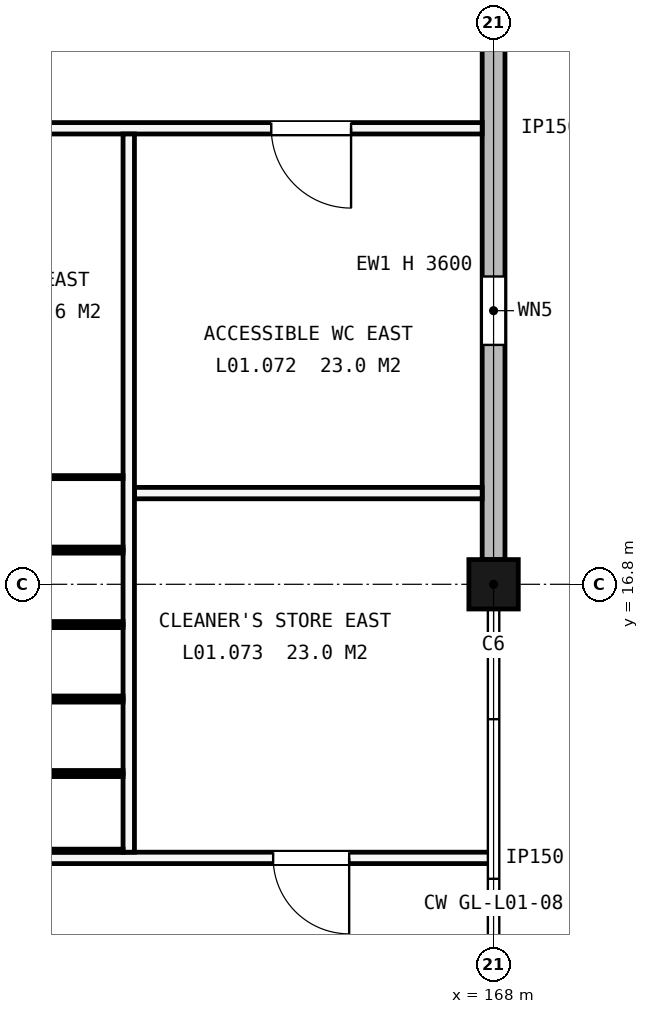
"""IFC4 building model, lengths in metres.
Left out: names, types, materials, properties, quantities, classifications, styles, units other than length and angle.
Written with IfcOpenShell. Run it as: python <this file> out.ifc"""

import sys

from ifc_helpers import new_model, si_unit, direction, frame, frame_2d, origin, origin_2d, place, context, subcontext, project, spatial, rectangle, extrude, element, fill, save


model = new_model("IFC4")
c1 = context("Model", 3, precision=1e-05, world=origin(), true_north=direction((0.0, 1.0)))
c2 = subcontext(c1, "Body", "Model", "MODEL_VIEW")
j1 = project(units=[si_unit("LENGTHUNIT", "METRE"), si_unit("PLANEANGLEUNIT", "RADIAN")], contexts=[c1])
p1 = place(None, origin())
s1 = spatial("IfcSite", under=j1, at=p1, CompositionType="ELEMENT")
p2 = place(p1, origin())
s2 = spatial("IfcBuilding", under=s1, at=p2, CompositionType="ELEMENT")
p3 = place(p2, frame((0.0, 0.0, 5.4)))
s3 = spatial("IfcBuildingStorey", under=s2, at=p3, CompositionType="ELEMENT", Elevation=5.4)
p4 = place(p3, frame((168.0, 16.8, -0.3), z_axis=(0.0, 0.0, 1.0), x_axis=(1.0, 0.0, 0.0)))
e1 = element("IfcColumn", 1, at=p4, inside=s3, PredefinedType="COLUMN", context=c2, shape_type="SweptSolid", body=[
    extrude(rectangle(XDim=0.65, YDim=0.65, at=origin_2d()), origin(), (0.0, 0.0, 1.0), 4.55),
])
p5 = place(p3, frame((168.0, 17.125, 0.0), z_axis=(0.0, 0.0, 1.0), x_axis=(0.0, 1.0, 0.0)))
e2 = element("IfcWall", 2, at=p5, inside=s3, PredefinedType="STANDARD", context=c2, shape_type="SweptSolid", body=[
    extrude(rectangle(XDim=7.75, YDim=0.3, at=frame_2d((3.875, 0.0))), origin(), (0.0, 0.0, 1.0), 3.6),
])
p6 = place(p5, frame((2.825, 0.0, 2.1)))
e3 = element("IfcOpeningElement", 3, at=p6, cuts=e2, PredefinedType="OPENING", context=c2, shape_type="SweptSolid", body=[
    extrude(rectangle(XDim=0.9, YDim=0.6, at=frame_2d((0.45, 0.3))), frame((0.0, 0.16, 0.0), z_axis=(0.0, -1.0, 0.0), x_axis=(1.0, 0.0, 0.0)), (0.0, 0.0, 1.0), 0.32),
])
p7 = place(p3, frame((151.275, 13.2, 0.0), z_axis=(0.0, 0.0, 1.0), x_axis=(1.0, 0.0, 0.0)))
e4 = element("IfcWall", 4, at=p7, inside=s3, PredefinedType="PARTITIONING", context=c2, shape_type="SweptSolid", body=[
    extrude(rectangle(XDim=16.725, YDim=0.15, at=frame_2d((8.363, 0.0))), origin(), (0.0, 0.0, 1.0), 4.2),
])
p8 = place(p7, frame((13.825, 0.0, 0.0)))
e5 = element("IfcOpeningElement", 5, at=p8, cuts=e4, PredefinedType="OPENING", context=c2, shape_type="SweptSolid", body=[
    extrude(rectangle(XDim=1.0, YDim=2.1, at=frame_2d((0.5, 1.05))), frame((0.0, 0.085, 0.0), z_axis=(0.0, -1.0, 0.0), x_axis=(1.0, 0.0, 0.0)), (0.0, 0.0, 1.0), 0.17),
])
p9 = place(p3, frame((163.275, 18.0, 0.0), z_axis=(0.0, 0.0, 1.0), x_axis=(1.0, 0.0, 0.0)))
e6 = element("IfcWall", 6, at=p9, inside=s3, PredefinedType="PARTITIONING", context=c2, shape_type="SweptSolid", body=[
    extrude(rectangle(XDim=4.575, YDim=0.15, at=frame_2d((2.288, 0.0))), origin(), (0.0, 0.0, 1.0), 4.2),
])
p10 = place(p3, frame((151.275, 22.8, 0.0), z_axis=(0.0, 0.0, 1.0), x_axis=(1.0, 0.0, 0.0)))
e7 = element("IfcWall", 7, at=p10, inside=s3, PredefinedType="PARTITIONING", context=c2, shape_type="SweptSolid", body=[
    extrude(rectangle(XDim=16.575, YDim=0.15, at=frame_2d((8.288, 0.0))), origin(), (0.0, 0.0, 1.0), 4.2),
])
p11 = place(p10, frame((2.475, 0.0, 0.0)))
e8 = element("IfcOpeningElement", 8, at=p11, cuts=e7, PredefinedType="OPENING", context=c2, shape_type="SweptSolid", body=[
    extrude(rectangle(XDim=0.9, YDim=2.1, at=frame_2d((0.45, 1.05))), frame((0.0, 0.085, 0.0), z_axis=(0.0, -1.0, 0.0), x_axis=(1.0, 0.0, 0.0)), (0.0, 0.0, 1.0), 0.17),
])
p12 = place(p10, frame((8.475, 0.0, 0.0)))
e9 = element("IfcOpeningElement", 9, at=p12, cuts=e7, PredefinedType="OPENING", context=c2, shape_type="SweptSolid", body=[
    extrude(rectangle(XDim=0.9, YDim=2.1, at=frame_2d((0.45, 1.05))), frame((0.0, 0.085, 0.0), z_axis=(0.0, -1.0, 0.0), x_axis=(1.0, 0.0, 0.0)), (0.0, 0.0, 1.0), 0.17),
])
p13 = place(p10, frame((13.8, 0.0, 0.0)))
e10 = element("IfcOpeningElement", 10, at=p13, cuts=e7, PredefinedType="OPENING", context=c2, shape_type="SweptSolid", body=[
    extrude(rectangle(XDim=1.05, YDim=2.25, at=frame_2d((0.525, 1.125))), frame((0.0, 0.085, 0.0), z_axis=(0.0, -1.0, 0.0), x_axis=(1.0, 0.0, 0.0)), (0.0, 0.0, 1.0), 0.17),
])
p14 = place(p3, frame((163.2, 13.275, 0.0), z_axis=(0.0, 0.0, 1.0), x_axis=(0.0, 1.0, 0.0)))
e11 = element("IfcWall", 11, at=p14, inside=s3, PredefinedType="PARTITIONING", context=c2, shape_type="SweptSolid", body=[
    extrude(rectangle(XDim=9.45, YDim=0.15, at=frame_2d((4.725, 0.0))), origin(), (0.0, 0.0, 1.0), 4.2),
])
for number, where, z_axis, x_axis in (
    (12, (163.125, 13.295, 0.0), (0.0, 0.0, 1.0), (-1.0, 0.0, 0.0)),
    (13, (163.125, 14.29, 0.0), (0.0, 0.0, 1.0), (-1.0, 0.0, 0.0)),
    (14, (163.125, 14.33, 0.0), (0.0, 0.0, 1.0), (-1.0, 0.0, 0.0)),
    (15, (163.125, 15.27, 0.0), (0.0, 0.0, 1.0), (-1.0, 0.0, 0.0)),
    (16, (163.125, 15.31, 0.0), (0.0, 0.0, 1.0), (-1.0, 0.0, 0.0)),
    (17, (163.125, 16.25, 0.0), (0.0, 0.0, 1.0), (-1.0, 0.0, 0.0)),
    (18, (163.125, 16.29, 0.0), (0.0, 0.0, 1.0), (-1.0, 0.0, 0.0)),
    (19, (163.125, 17.23, 0.0), (0.0, 0.0, 1.0), (-1.0, 0.0, 0.0)),
    (20, (163.125, 17.27, 0.0), (0.0, 0.0, 1.0), (-1.0, 0.0, 0.0)),
    (21, (163.125, 18.21, 0.0), (0.0, 0.0, 1.0), (-1.0, 0.0, 0.0)),
):
    element("IfcWall", number, at=place(p3, frame(where, z_axis=z_axis, x_axis=x_axis)), inside=s3, PredefinedType="PARTITIONING", context=c2, shape_type="SweptSolid", body=[
        extrude(rectangle(XDim=1.595, YDim=0.04, at=frame_2d((0.797, 0.0))), origin(), (0.0, 0.0, 1.0), 2.0),
    ])
p15 = place(p6, origin())
e22 = element("IfcWindow", 22, at=p15, inside=s3, PartitioningType="SINGLE_PANEL", PredefinedType="WINDOW", context=c2, shape_type="SweptSolid", body=[
    extrude(rectangle(XDim=0.9, YDim=0.6, at=frame_2d((0.45, 0.3))), frame((0.0, 0.03, 0.0), z_axis=(0.0, -1.0, 0.0), x_axis=(1.0, 0.0, 0.0)), (0.0, 0.0, 1.0), 0.06),
])
fill(e3, e22)
p16 = place(p13, origin())
e23 = element("IfcDoor", 23, at=p16, inside=s3, OperationType="SINGLE_SWING_RIGHT", PredefinedType="DOOR", context=c2, shape_type="SweptSolid", body=[
    extrude(rectangle(XDim=1.05, YDim=2.25, at=frame_2d((0.525, 1.125))), frame((0.0, 0.025, 0.0), z_axis=(0.0, -1.0, 0.0), x_axis=(1.0, 0.0, 0.0)), (0.0, 0.0, 1.0), 0.05),
])
fill(e10, e23)
p17 = place(p8, origin())
e24 = element("IfcDoor", 24, at=p17, inside=s3, OperationType="SINGLE_SWING_RIGHT", PredefinedType="DOOR", context=c2, shape_type="SweptSolid", body=[
    extrude(rectangle(XDim=1.0, YDim=2.1, at=frame_2d((0.5, 1.05))), frame((0.0, 0.025, 0.0), z_axis=(0.0, -1.0, 0.0), x_axis=(1.0, 0.0, 0.0)), (0.0, 0.0, 1.0), 0.05),
])
fill(e5, e24)
save(model, sys.argv[1])
